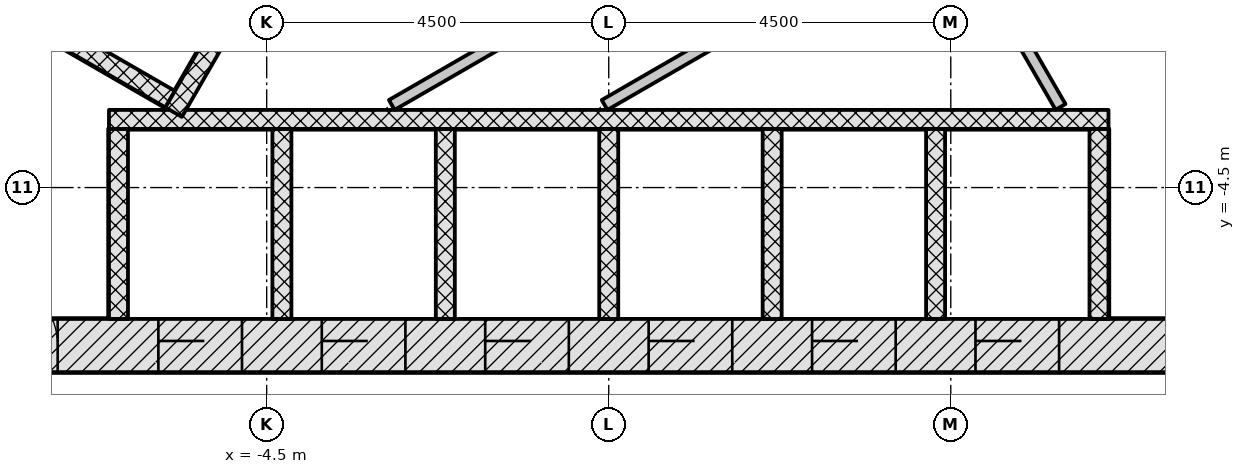
"""IFC4 building model, lengths in metres.
Left out: names, types, materials, properties, quantities, classifications, styles, units other than length and angle.
Written with IfcOpenShell. Run it as: python <this file> out.ifc"""

import sys

from ifc_helpers import new_model, si_unit, direction, frame, frame_2d, origin, place, context, subcontext, project, spatial, rectangle, extrude, element, fill, save


model = new_model("IFC4")
c1 = context("Model", 3, precision=1e-05, world=origin(), true_north=direction((0.0, 1.0)))
c2 = subcontext(c1, "Body", "Model", "MODEL_VIEW")
j1 = project(units=[si_unit("LENGTHUNIT", "METRE"), si_unit("PLANEANGLEUNIT", "RADIAN")], contexts=[c1])
p1 = place(None, origin())
s1 = spatial("IfcSite", under=j1, at=p1, CompositionType="ELEMENT")
p2 = place(p1, origin())
s2 = spatial("IfcBuilding", under=s1, at=p2, CompositionType="ELEMENT")
p3 = place(p2, frame((0.0, 0.0, 34.8)))
s3 = spatial("IfcBuildingStorey", under=s2, at=p3, CompositionType="ELEMENT", Elevation=34.8)
p4 = place(p3, frame((-9.229, -6.578, -0.2), z_axis=(0.0, 0.0, 1.0), x_axis=(1.0, 0.0, 0.0)))
e1 = element("IfcWall", 1, at=p4, inside=s3, PredefinedType="SHEAR", context=c2, shape_type="SweptSolid", body=[
    extrude(rectangle(XDim=18.458, YDim=0.7, at=frame_2d((9.229, 0.0))), origin(), (0.0, 0.0, 1.0), 3.6),
])
p5 = place(p4, frame((3.304, 0.0, 0.2)))
e2 = element("IfcOpeningElement", 2, at=p5, cuts=e1, PredefinedType="OPENING", context=c2, shape_type="SweptSolid", body=[
    extrude(rectangle(XDim=1.1, YDim=2.1, at=frame_2d((0.55, 1.05))), frame((0.0, 0.36, 0.0), z_axis=(0.0, -1.0, 0.0), x_axis=(1.0, 0.0, 0.0)), (0.0, 0.0, 1.0), 0.72),
])
p6 = place(p4, frame((5.454, 0.0, 0.2)))
e3 = element("IfcOpeningElement", 3, at=p6, cuts=e1, PredefinedType="OPENING", context=c2, shape_type="SweptSolid", body=[
    extrude(rectangle(XDim=1.1, YDim=2.1, at=frame_2d((0.55, 1.05))), frame((0.0, 0.36, 0.0), z_axis=(0.0, -1.0, 0.0), x_axis=(1.0, 0.0, 0.0)), (0.0, 0.0, 1.0), 0.72),
])
p7 = place(p4, frame((7.604, 0.0, 0.2)))
e4 = element("IfcOpeningElement", 4, at=p7, cuts=e1, PredefinedType="OPENING", context=c2, shape_type="SweptSolid", body=[
    extrude(rectangle(XDim=1.1, YDim=2.1, at=frame_2d((0.55, 1.05))), frame((0.0, 0.36, 0.0), z_axis=(0.0, -1.0, 0.0), x_axis=(1.0, 0.0, 0.0)), (0.0, 0.0, 1.0), 0.72),
])
p8 = place(p4, frame((9.754, 0.0, 0.2)))
e5 = element("IfcOpeningElement", 5, at=p8, cuts=e1, PredefinedType="OPENING", context=c2, shape_type="SweptSolid", body=[
    extrude(rectangle(XDim=1.1, YDim=2.1, at=frame_2d((0.55, 1.05))), frame((0.0, 0.36, 0.0), z_axis=(0.0, -1.0, 0.0), x_axis=(1.0, 0.0, 0.0)), (0.0, 0.0, 1.0), 0.72),
])
p9 = place(p4, frame((11.904, 0.0, 0.2)))
e6 = element("IfcOpeningElement", 6, at=p9, cuts=e1, PredefinedType="OPENING", context=c2, shape_type="SweptSolid", body=[
    extrude(rectangle(XDim=1.1, YDim=2.1, at=frame_2d((0.55, 1.05))), frame((0.0, 0.36, 0.0), z_axis=(0.0, -1.0, 0.0), x_axis=(1.0, 0.0, 0.0)), (0.0, 0.0, 1.0), 0.72),
])
p10 = place(p4, frame((14.054, 0.0, 0.2)))
e7 = element("IfcOpeningElement", 7, at=p10, cuts=e1, PredefinedType="OPENING", context=c2, shape_type="SweptSolid", body=[
    extrude(rectangle(XDim=1.1, YDim=2.1, at=frame_2d((0.55, 1.05))), frame((0.0, 0.36, 0.0), z_axis=(0.0, -1.0, 0.0), x_axis=(1.0, 0.0, 0.0)), (0.0, 0.0, 1.0), 0.72),
])
p11 = place(p4, frame((1.079, 0.0, 0.2)))
e8 = element("IfcOpeningElement", 8, at=p11, cuts=e1, PredefinedType="OPENING", context=c2, shape_type="SweptSolid", body=[
    extrude(rectangle(XDim=0.9, YDim=2.1, at=frame_2d((0.45, 1.05))), frame((0.0, 0.36, 0.0), z_axis=(0.0, -1.0, 0.0), x_axis=(1.0, 0.0, 0.0)), (0.0, 0.0, 1.0), 0.72),
])
p12 = place(p3, frame((10.311, -4.703, -0.2), z_axis=(0.0, 0.0, 1.0), x_axis=(-0.500001446645, 0.866024568562, 0.0)))
e9 = element("IfcWall", 9, at=p12, inside=s3, PredefinedType="SHEAR", context=c2, shape_type="SweptSolid", body=[
    extrude(rectangle(XDim=18.458, YDim=0.7, at=frame_2d((9.229, 0.0))), origin(), (0.0, 0.0, 1.0), 3.6),
])
p13 = place(p12, frame((6.5, 0.0, 0.2)))
e10 = element("IfcOpeningElement", 10, at=p13, cuts=e9, PredefinedType="OPENING", context=c2, shape_type="SweptSolid", body=[
    extrude(rectangle(XDim=1.0, YDim=2.1, at=frame_2d((0.5, 1.05))), frame((0.0, 0.36, 0.0), z_axis=(0.0, -1.0, 0.0), x_axis=(1.0, 0.0, 0.0)), (0.0, 0.0, 1.0), 0.72),
])
p14 = place(p12, frame((2.902, 0.0, 0.2)))
e11 = element("IfcOpeningElement", 11, at=p14, cuts=e9, PredefinedType="OPENING", context=c2, shape_type="SweptSolid", body=[
    extrude(rectangle(XDim=0.9, YDim=2.1, at=frame_2d((0.45, 1.05))), frame((0.0, 0.36, 0.0), z_axis=(0.0, -1.0, 0.0), x_axis=(1.0, 0.0, 0.0)), (0.0, 0.0, 1.0), 0.72),
])
p15 = place(p12, frame((8.75, 0.0, 0.2)))
e12 = element("IfcOpeningElement", 12, at=p15, cuts=e9, PredefinedType="OPENING", context=c2, shape_type="SweptSolid", body=[
    extrude(rectangle(XDim=1.0, YDim=2.1, at=frame_2d((0.5, 1.05))), frame((0.0, 0.36, 0.0), z_axis=(0.0, -1.0, 0.0), x_axis=(1.0, 0.0, 0.0)), (0.0, 0.0, 1.0), 0.72),
])
p16 = place(p12, frame((13.977, 0.0, 0.2)))
e13 = element("IfcOpeningElement", 13, at=p16, cuts=e9, PredefinedType="OPENING", context=c2, shape_type="SweptSolid", body=[
    extrude(rectangle(XDim=0.9, YDim=2.1, at=frame_2d((0.45, 1.05))), frame((0.0, 0.36, 0.0), z_axis=(0.0, -1.0, 0.0), x_axis=(1.0, 0.0, 0.0)), (0.0, 0.0, 1.0), 0.72),
])
p17 = place(p3, frame((-1.083, 11.281, -0.2), z_axis=(0.0, 0.0, 1.0), x_axis=(-0.500001446645, -0.866024568562, 0.0)))
e14 = element("IfcWall", 14, at=p17, inside=s3, PredefinedType="SHEAR", context=c2, shape_type="SweptSolid", body=[
    extrude(rectangle(XDim=18.458, YDim=0.7, at=frame_2d((9.229, 0.0))), origin(), (0.0, 0.0, 1.0), 3.6),
])
p18 = place(p17, frame((8.979, 0.0, 0.2)))
e15 = element("IfcOpeningElement", 15, at=p18, cuts=e14, PredefinedType="OPENING", context=c2, shape_type="SweptSolid", body=[
    extrude(rectangle(XDim=1.2, YDim=2.1, at=frame_2d((0.6, 1.05))), frame((0.0, 0.36, 0.0), z_axis=(0.0, -1.0, 0.0), x_axis=(1.0, 0.0, 0.0)), (0.0, 0.0, 1.0), 0.72),
])
p19 = place(p17, frame((11.029, 0.0, 0.2)))
e16 = element("IfcOpeningElement", 16, at=p19, cuts=e14, PredefinedType="OPENING", context=c2, shape_type="SweptSolid", body=[
    extrude(rectangle(XDim=1.2, YDim=2.1, at=frame_2d((0.6, 1.05))), frame((0.0, 0.36, 0.0), z_axis=(0.0, -1.0, 0.0), x_axis=(1.0, 0.0, 0.0)), (0.0, 0.0, 1.0), 0.72),
])
for number, where, z_axis, x_axis in (
    (17, (-6.45, -6.228, -0.2), (0.0, 0.0, 1.0), (0.0, 1.0, 0.0)),
    (18, (-4.3, -6.228, -0.2), (0.0, 0.0, 1.0), (0.0, 1.0, 0.0)),
    (19, (-2.15, -6.228, -0.2), (0.0, 0.0, 1.0), (0.0, 1.0, 0.0)),
    (20, (0.0, -6.228, -0.2), (0.0, 0.0, 1.0), (0.0, 1.0, 0.0)),
    (21, (2.15, -6.228, -0.2), (0.0, 0.0, 1.0), (0.0, 1.0, 0.0)),
    (22, (4.3, -6.228, -0.2), (0.0, 0.0, 1.0), (0.0, 1.0, 0.0)),
    (23, (6.45, -6.228, -0.2), (0.0, 0.0, 1.0), (0.0, 1.0, 0.0)),
):
    element("IfcWall", number, at=place(p3, frame(where, z_axis=z_axis, x_axis=x_axis)), inside=s3, PredefinedType="PARTITIONING", context=c2, shape_type="SweptSolid", body=[
        extrude(rectangle(XDim=2.5, YDim=0.25, at=frame_2d((1.25, 0.0))), origin(), (0.0, 0.0, 1.0), 3.6),
    ])
p20 = place(p3, frame((-6.575, -3.603, 0.0), z_axis=(0.0, 0.0, 1.0), x_axis=(1.0, 0.0, 0.0)))
e24 = element("IfcWall", 24, at=p20, inside=s3, PredefinedType="PARTITIONING", context=c2, shape_type="SweptSolid", body=[
    extrude(rectangle(XDim=13.15, YDim=0.25, at=frame_2d((6.575, 0.0))), origin(), (0.0, 0.0, 1.0), 3.4),
])
p21 = place(p3, frame((-8.281, -1.887, -0.2), z_axis=(0.0, 0.0, 1.0), x_axis=(0.866032775405, -0.499987231761, 0.0)))
e25 = element("IfcWall", 25, at=p21, inside=s3, PredefinedType="PARTITIONING", context=c2, shape_type="SweptSolid", body=[
    extrude(rectangle(XDim=2.9, YDim=0.25, at=frame_2d((1.45, 0.0))), origin(), (0.0, 0.0, 1.0), 3.6),
])
p22 = place(p3, frame((0.176, 6.711, 0.0), z_axis=(0.0, 0.0, 1.0), x_axis=(-0.500004227369, -0.866022963098, 0.0)))
e26 = element("IfcWall", 26, at=p22, inside=s3, PredefinedType="PARTITIONING", context=c2, shape_type="SweptSolid", body=[
    extrude(rectangle(XDim=11.8, YDim=0.25, at=frame_2d((5.9, 0.0))), origin(), (0.0, 0.0, 1.0), 3.4),
])
p23 = place(p3, frame((-2.854, -3.413, 0.0), z_axis=(0.0, 0.0, 1.0), x_axis=(0.866030102318, 0.499991861813, 0.0)))
e27 = element("IfcWall", 27, at=p23, inside=s3, PredefinedType="PARTITIONING", context=c2, shape_type="SweptSolid", body=[
    extrude(rectangle(XDim=10.407, YDim=0.15, at=frame_2d((5.204, 0.0))), origin(), (0.0, 0.0, 1.0), 3.4),
])
p24 = place(p23, frame((3.354, 0.0, 0.0)))
e28 = element("IfcOpeningElement", 28, at=p24, cuts=e27, PredefinedType="OPENING", context=c2, shape_type="SweptSolid", body=[
    extrude(rectangle(XDim=0.9, YDim=2.1, at=frame_2d((0.45, 1.05))), frame((0.0, 0.085, 0.0), z_axis=(0.0, -1.0, 0.0), x_axis=(1.0, 0.0, 0.0)), (0.0, 0.0, 1.0), 0.17),
])
p25 = place(p3, frame((5.944, -3.439, 0.0), z_axis=(0.0, 0.0, 1.0), x_axis=(-0.499997367627, 0.86602692358, 0.0)))
e29 = element("IfcWall", 29, at=p25, inside=s3, PredefinedType="PARTITIONING", context=c2, shape_type="SweptSolid", body=[
    extrude(rectangle(XDim=2.947, YDim=0.15, at=frame_2d((1.473, 0.0))), origin(), (0.0, 0.0, 1.0), 3.4),
])
p26 = place(p3, frame((-0.054, -3.413, 0.0), z_axis=(0.0, 0.0, 1.0), x_axis=(0.866026668906, 0.499997808738, 0.0)))
e30 = element("IfcWall", 30, at=p26, inside=s3, PredefinedType="PARTITIONING", context=c2, shape_type="SweptSolid", body=[
    extrude(rectangle(XDim=7.982, YDim=0.15, at=frame_2d((3.991, 0.0))), origin(), (0.0, 0.0, 1.0), 3.4),
])
p27 = place(p26, frame((2.092, 0.0, 0.0)))
e31 = element("IfcOpeningElement", 31, at=p27, cuts=e30, PredefinedType="OPENING", context=c2, shape_type="SweptSolid", body=[
    extrude(rectangle(XDim=1.0, YDim=2.1, at=frame_2d((0.5, 1.05))), frame((0.0, 0.085, 0.0), z_axis=(0.0, -1.0, 0.0), x_axis=(1.0, 0.0, 0.0)), (0.0, 0.0, 1.0), 0.17),
])
p28 = place(p3, frame((-17.208, -3.699, 0.0), z_axis=(0.0, 0.0, 1.0), x_axis=(0.499997567621, 0.866026808115, 0.0)))
e32 = element("IfcWall", 32, at=p28, inside=s3, PredefinedType="PARTITIONING", context=c2, shape_type="SweptSolid", body=[
    extrude(rectangle(XDim=23.736, YDim=0.15, at=frame_2d((11.868, 0.0))), origin(), (0.0, 0.0, 1.0), 2.768),
])
p29 = place(p28, frame((19.07, 0.0, 0.0)))
e33 = element("IfcOpeningElement", 33, at=p29, cuts=e32, PredefinedType="OPENING", context=c2, shape_type="SweptSolid", body=[
    extrude(rectangle(XDim=1.1, YDim=2.1, at=frame_2d((0.55, 1.05))), frame((0.0, 0.085, 0.0), z_axis=(0.0, -1.0, 0.0), x_axis=(1.0, 0.0, 0.0)), (0.0, 0.0, 1.0), 0.17),
])
p30 = place(p28, frame((7.225, 0.0, 0.0)))
e34 = element("IfcOpeningElement", 34, at=p30, cuts=e32, PredefinedType="OPENING", context=c2, shape_type="SweptSolid", body=[
    extrude(rectangle(XDim=1.5, YDim=2.1, at=frame_2d((0.75, 1.05))), frame((0.0, 0.085, 0.0), z_axis=(0.0, -1.0, 0.0), x_axis=(1.0, 0.0, 0.0)), (0.0, 0.0, 1.0), 0.17),
])
p31 = place(p3, frame((5.981, 8.446, 0.0), z_axis=(0.0, 0.0, 1.0), x_axis=(0.499996620721, -0.866027354803, 0.0)))
e35 = element("IfcWall", 35, at=p31, inside=s3, PredefinedType="PARTITIONING", context=c2, shape_type="SweptSolid", body=[
    extrude(rectangle(XDim=15.057, YDim=0.15, at=frame_2d((7.528, 0.0))), origin(), (0.0, 0.0, 1.0), 2.768),
])
p32 = place(p31, frame((11.311, 0.0, 0.0)))
e36 = element("IfcOpeningElement", 36, at=p32, cuts=e35, PredefinedType="OPENING", context=c2, shape_type="SweptSolid", body=[
    extrude(rectangle(XDim=1.0, YDim=2.1, at=frame_2d((0.5, 1.05))), frame((0.0, 0.085, 0.0), z_axis=(0.0, -1.0, 0.0), x_axis=(1.0, 0.0, 0.0)), (0.0, 0.0, 1.0), 0.17),
])
p33 = place(p31, frame((4.754, 0.0, 0.0)))
e37 = element("IfcOpeningElement", 37, at=p33, cuts=e35, PredefinedType="OPENING", context=c2, shape_type="SweptSolid", body=[
    extrude(rectangle(XDim=1.1, YDim=2.1, at=frame_2d((0.55, 1.05))), frame((0.0, 0.085, 0.0), z_axis=(0.0, -1.0, 0.0), x_axis=(1.0, 0.0, 0.0)), (0.0, 0.0, 1.0), 0.17),
])
p34 = place(p5, origin())
e38 = element("IfcDoor", 38, at=p34, inside=s3, OperationType="DOUBLE_DOOR_SLIDING", PredefinedType="DOOR", context=c2, shape_type="SweptSolid", body=[
    extrude(rectangle(XDim=1.1, YDim=2.1, at=frame_2d((0.55, 1.05))), frame((0.0, 0.025, 0.0), z_axis=(0.0, -1.0, 0.0), x_axis=(1.0, 0.0, 0.0)), (0.0, 0.0, 1.0), 0.05),
])
fill(e2, e38)
p35 = place(p6, origin())
e39 = element("IfcDoor", 39, at=p35, inside=s3, OperationType="DOUBLE_DOOR_SLIDING", PredefinedType="DOOR", context=c2, shape_type="SweptSolid", body=[
    extrude(rectangle(XDim=1.1, YDim=2.1, at=frame_2d((0.55, 1.05))), frame((0.0, 0.025, 0.0), z_axis=(0.0, -1.0, 0.0), x_axis=(1.0, 0.0, 0.0)), (0.0, 0.0, 1.0), 0.05),
])
fill(e3, e39)
p36 = place(p7, origin())
e40 = element("IfcDoor", 40, at=p36, inside=s3, OperationType="DOUBLE_DOOR_SLIDING", PredefinedType="DOOR", context=c2, shape_type="SweptSolid", body=[
    extrude(rectangle(XDim=1.1, YDim=2.1, at=frame_2d((0.55, 1.05))), frame((0.0, 0.025, 0.0), z_axis=(0.0, -1.0, 0.0), x_axis=(1.0, 0.0, 0.0)), (0.0, 0.0, 1.0), 0.05),
])
fill(e4, e40)
p37 = place(p8, origin())
e41 = element("IfcDoor", 41, at=p37, inside=s3, OperationType="DOUBLE_DOOR_SLIDING", PredefinedType="DOOR", context=c2, shape_type="SweptSolid", body=[
    extrude(rectangle(XDim=1.1, YDim=2.1, at=frame_2d((0.55, 1.05))), frame((0.0, 0.025, 0.0), z_axis=(0.0, -1.0, 0.0), x_axis=(1.0, 0.0, 0.0)), (0.0, 0.0, 1.0), 0.05),
])
fill(e5, e41)
p38 = place(p9, origin())
e42 = element("IfcDoor", 42, at=p38, inside=s3, OperationType="DOUBLE_DOOR_SLIDING", PredefinedType="DOOR", context=c2, shape_type="SweptSolid", body=[
    extrude(rectangle(XDim=1.1, YDim=2.1, at=frame_2d((0.55, 1.05))), frame((0.0, 0.025, 0.0), z_axis=(0.0, -1.0, 0.0), x_axis=(1.0, 0.0, 0.0)), (0.0, 0.0, 1.0), 0.05),
])
fill(e6, e42)
p39 = place(p10, origin())
e43 = element("IfcDoor", 43, at=p39, inside=s3, OperationType="DOUBLE_DOOR_SLIDING", PredefinedType="DOOR", context=c2, shape_type="SweptSolid", body=[
    extrude(rectangle(XDim=1.1, YDim=2.1, at=frame_2d((0.55, 1.05))), frame((0.0, 0.025, 0.0), z_axis=(0.0, -1.0, 0.0), x_axis=(1.0, 0.0, 0.0)), (0.0, 0.0, 1.0), 0.05),
])
fill(e7, e43)
p40 = place(p11, origin())
e44 = element("IfcDoor", 44, at=p40, inside=s3, OperationType="SINGLE_SWING_LEFT", PredefinedType="DOOR", context=c2, shape_type="SweptSolid", body=[
    extrude(rectangle(XDim=0.9, YDim=2.1, at=frame_2d((0.45, 1.05))), frame((0.0, 0.075, 0.0), z_axis=(0.0, -1.0, 0.0), x_axis=(1.0, 0.0, 0.0)), (0.0, 0.0, 1.0), 0.15),
])
fill(e8, e44)
save(model, sys.argv[1])
